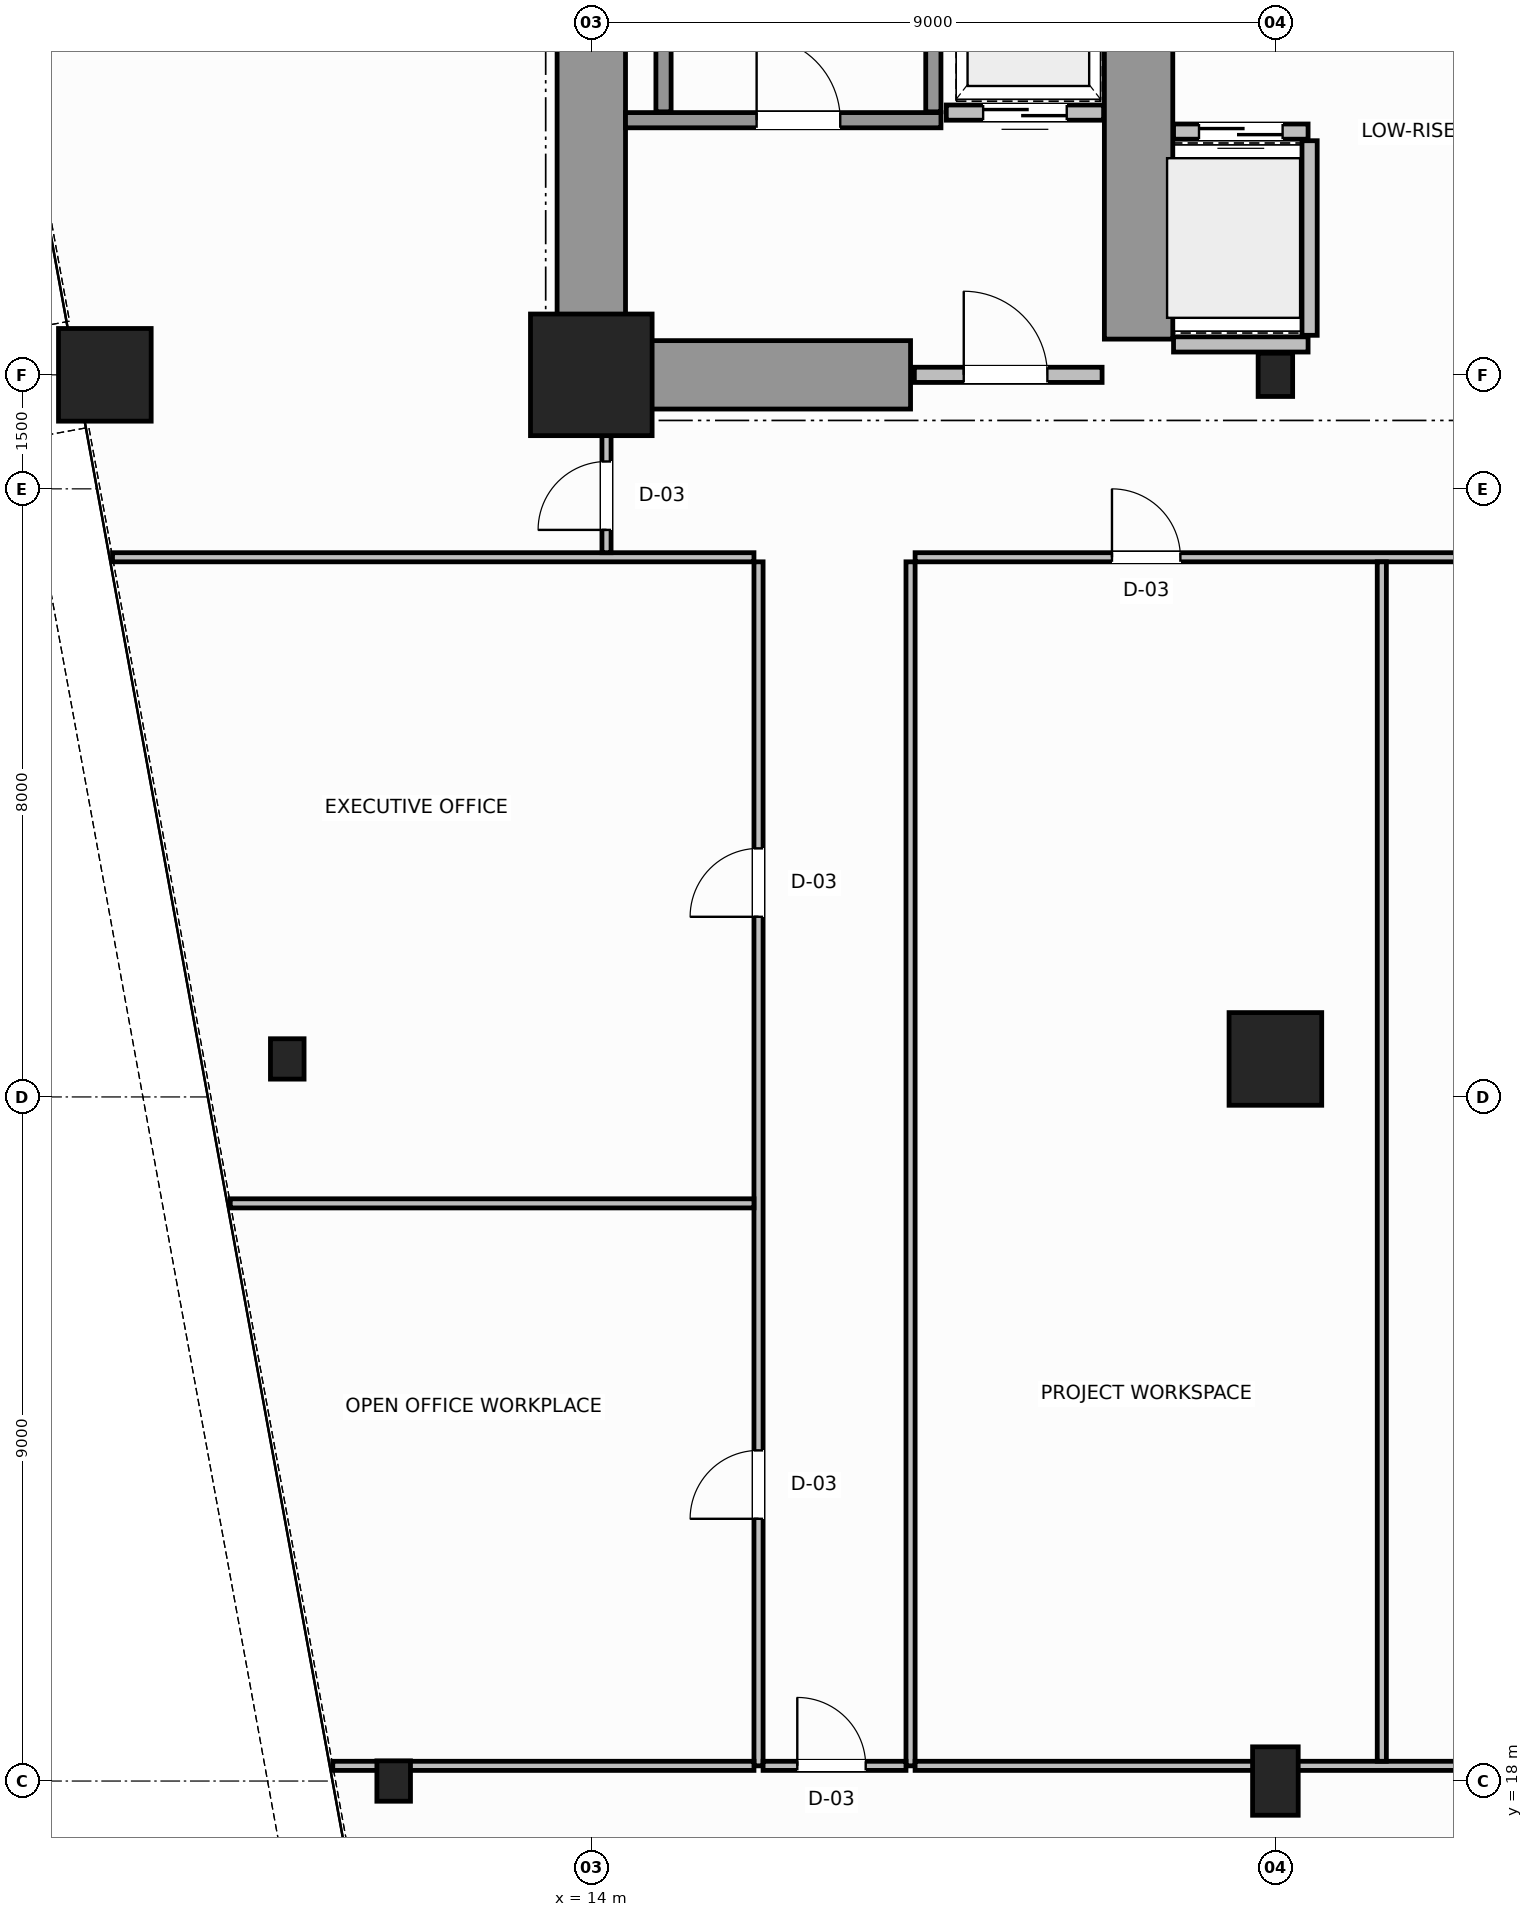
"""IFC4 building model, lengths in metres.
Left out: names, types, materials, properties, quantities, classifications, styles, units other than length and angle.
Written with IfcOpenShell. Run it as: python <this file> out.ifc"""

import sys

from ifc_helpers import new_model, si_unit, direction, frame, frame_2d, origin, origin_2d, place, context, subcontext, project, spatial, rectangle, hollow_rectangle, hollow_circle, i_section, extrude, source, transform, mapped, element, fill, save


model = new_model("IFC4")
c1 = context("Model", 3, precision=1e-05, world=origin(), true_north=direction((0.0, 1.0)))
c2 = subcontext(c1, "Body", "Model", "MODEL_VIEW")
j1 = project(units=[si_unit("LENGTHUNIT", "METRE"), si_unit("PLANEANGLEUNIT", "RADIAN")], contexts=[c1])
p1 = place(None, origin())
s1 = spatial("IfcSite", under=j1, at=p1, CompositionType="ELEMENT")
p2 = place(p1, origin())
s2 = spatial("IfcBuilding", under=s1, at=p2, CompositionType="ELEMENT")
p3 = place(p2, frame((0.0, 0.0, 56.8)))
s3 = spatial("IfcBuildingStorey", under=s2, at=p3, CompositionType="ELEMENT", Elevation=56.8)
m1 = source(origin(), c2, "Body", "SweptSolid", [
    extrude(rectangle(XDim=1.6, YDim=1.6, at=origin_2d()), origin(), (0.0, 0.0, 1.0), 3.8),
])
p4 = place(p3, frame((14.0, 36.5, 0.0), z_axis=(0.0, 0.0, 1.0), x_axis=(1.0, 0.0, 0.0)))
e1 = element("IfcColumn", 1, at=p4, inside=s3, PredefinedType="COLUMN", context=c2, shape_type="MappedRepresentation", body=[
    mapped(m1, transform((0.0, 0.0, 0.0), scale=1.0)),
])
m2 = source(origin(), c2, "Body", "SweptSolid", [
    extrude(i_section(OverallWidth=0.454, OverallDepth=0.569, WebThickness=0.078, FlangeThickness=0.08, FilletRadius=0.015, at=origin_2d()), origin(), (0.0, 0.0, 1.0), 3.8),
])
p5 = place(p3, frame((23.0, 36.5, 0.0), z_axis=(0.0, 0.0, 1.0), x_axis=(1.0, 0.0, 0.0)))
e2 = element("IfcColumn", 2, at=p5, inside=s3, PredefinedType="COLUMN", context=c2, shape_type="MappedRepresentation", body=[
    mapped(m2, transform((0.0, 0.0, 0.0), scale=1.0)),
])
m3 = source(origin(), c2, "Body", "SweptSolid", [
    extrude(hollow_circle(Radius=0.61, WallThickness=0.05, at=origin_2d()), origin(), (0.0, 0.0, 1.0), 3.8),
])
p6 = place(p3, frame((7.6, 36.5, 0.0), z_axis=(0.0, 0.0, 1.0), x_axis=(1.0, 0.0, 0.0)))
e3 = element("IfcColumn", 3, at=p6, inside=s3, PredefinedType="COLUMN", context=c2, shape_type="MappedRepresentation", body=[
    mapped(m3, transform((0.0, 0.0, 0.0), scale=1.0)),
])
m4 = source(origin(), c2, "Body", "SweptSolid", [
    extrude(i_section(OverallWidth=0.442, OverallDepth=0.531, WebThickness=0.065, FlangeThickness=0.076, FilletRadius=0.015, at=origin_2d()), origin(), (0.0, 0.0, 1.0), 3.8),
])
for number, where, z_axis, x_axis in (
    (4, (10.0, 27.5, 0.0), (0.0, 0.0, 1.0), (1.0, 0.0, 0.0)),
    (5, (11.4, 18.0, 0.0), (0.0, 0.0, 1.0), (1.0, 0.0, 0.0)),
):
    element("IfcColumn", number, at=place(p3, frame(where, z_axis=z_axis, x_axis=x_axis)), inside=s3, PredefinedType="COLUMN", context=c2, shape_type="MappedRepresentation", body=[
        mapped(m4, transform((0.0, 0.0, 0.0), scale=1.0)),
    ])
p7 = place(p3, frame((23.0, 27.5, 0.0), z_axis=(0.0, 0.0, 1.0), x_axis=(1.0, 0.0, 0.0)))
e6 = element("IfcColumn", 6, at=p7, inside=s3, PredefinedType="COLUMN", context=c2, shape_type="MappedRepresentation", body=[
    mapped(m3, transform((0.0, 0.0, 0.0), scale=1.0)),
])
m5 = source(origin(), c2, "Body", "SweptSolid", [
    extrude(hollow_rectangle(XDim=0.6, YDim=0.9, WallThickness=0.04, InnerFilletRadius=0.04, OuterFilletRadius=0.08, at=origin_2d()), origin(), (0.0, 0.0, 1.0), 3.8),
])
p8 = place(p3, frame((23.0, 18.0, 0.0), z_axis=(0.0, 0.0, 1.0), x_axis=(1.0, 0.0, 0.0)))
e7 = element("IfcColumn", 7, at=p8, inside=s3, PredefinedType="COLUMN", context=c2, shape_type="MappedRepresentation", body=[
    mapped(m5, transform((0.0, 0.0, 0.0), scale=1.0)),
])
p9 = place(p3, frame((14.0, 36.5, 0.0), z_axis=(0.0, 0.0, 1.0), x_axis=(0.0, 1.0, 0.0)))
e8 = element("IfcWall", 8, at=p9, inside=s3, PredefinedType="SHEAR", context=c2, shape_type="SweptSolid", body=[
    extrude(rectangle(XDim=14.5, YDim=0.9, at=frame_2d((7.25, 0.0))), origin(), (0.0, 0.0, 1.0), 3.8),
])
p10 = place(p3, frame((14.47, 36.5, 0.0), z_axis=(0.0, 0.0, 1.0), x_axis=(1.0, 0.0, 0.0)))
e9 = element("IfcWall", 9, at=p10, inside=s3, PredefinedType="SHEAR", context=c2, shape_type="SweptSolid", body=[
    extrude(rectangle(XDim=3.73, YDim=0.9, at=frame_2d((1.865, 0.0))), origin(), (0.0, 0.0, 1.0), 2.38),
])
p11 = place(p3, frame((21.2, 36.97, 0.0), z_axis=(0.0, 0.0, 1.0), x_axis=(0.0, 1.0, 0.0)))
e10 = element("IfcWall", 10, at=p11, inside=s3, PredefinedType="SHEAR", context=c2, shape_type="SweptSolid", body=[
    extrude(rectangle(XDim=9.23, YDim=0.9, at=frame_2d((4.615, 0.0))), origin(), (0.0, 0.0, 1.0), 3.8),
])
p12 = place(p3, frame((14.45, 39.85, 0.0), z_axis=(0.0, 0.0, 1.0), x_axis=(1.0, 0.0, 0.0)))
e11 = element("IfcWall", 11, at=p12, inside=s3, PredefinedType="SOLIDWALL", context=c2, shape_type="SweptSolid", body=[
    extrude(rectangle(XDim=4.15, YDim=0.2, at=frame_2d((2.075, 0.0))), origin(), (0.0, 0.0, 1.0), 3.8),
])
p13 = place(p12, frame((1.725, 0.0, 0.0)))
e12 = element("IfcOpeningElement", 12, at=p13, cuts=e11, PredefinedType="OPENING", context=c2, shape_type="SweptSolid", body=[
    extrude(rectangle(XDim=1.1, YDim=2.15, at=frame_2d((0.55, 1.075))), frame((0.0, 0.11, 0.0), z_axis=(0.0, -1.0, 0.0), x_axis=(1.0, 0.0, 0.0)), (0.0, 0.0, 1.0), 0.22),
])
for number, where, z_axis, x_axis in (
    (13, (14.95, 39.96, 0.0), (0.0, 0.0, 1.0), (0.0, 1.0, 0.0)),
    (14, (18.5, 39.96, 0.0), (0.0, 0.0, 1.0), (0.0, 1.0, 0.0)),
):
    element("IfcWall", number, at=place(p3, frame(where, z_axis=z_axis, x_axis=x_axis)), inside=s3, PredefinedType="SOLIDWALL", context=c2, shape_type="SweptSolid", body=[
        extrude(rectangle(XDim=9.93, YDim=0.2, at=frame_2d((4.965, 0.0))), origin(), (0.0, 0.0, 1.0), 3.8),
    ])
p14 = place(p3, frame((18.25, 36.5, 0.0), z_axis=(0.0, 0.0, 1.0), x_axis=(1.0, 0.0, 0.0)))
e15 = element("IfcWall", 15, at=p14, inside=s3, PredefinedType="SOLIDWALL", context=c2, shape_type="SweptSolid", body=[
    extrude(rectangle(XDim=2.47, YDim=0.2, at=frame_2d((1.235, 0.0))), origin(), (0.0, 0.0, 1.0), 2.37),
])
p15 = place(p14, frame((0.65, 0.0, 0.0)))
e16 = element("IfcOpeningElement", 16, at=p15, cuts=e15, PredefinedType="OPENING", context=c2, shape_type="SweptSolid", body=[
    extrude(rectangle(XDim=1.1, YDim=2.15, at=frame_2d((0.55, 1.075))), frame((0.0, 0.11, 0.0), z_axis=(0.0, -1.0, 0.0), x_axis=(1.0, 0.0, 0.0)), (0.0, 0.0, 1.0), 0.22),
])
p16 = place(p3, frame((21.66, 39.7, 0.0), z_axis=(0.0, 0.0, 1.0), x_axis=(1.0, 0.0, 0.0)))
e17 = element("IfcWall", 17, at=p16, inside=s3, PredefinedType="SOLIDWALL", context=c2, shape_type="SweptSolid", body=[
    extrude(rectangle(XDim=1.77, YDim=0.2, at=frame_2d((0.885, 0.0))), origin(), (0.0, 0.0, 1.0), 3.58),
])
p17 = place(p16, frame((0.335, 0.0, 0.0)))
e18 = element("IfcOpeningElement", 18, at=p17, cuts=e17, PredefinedType="OPENING", context=c2, shape_type="SweptSolid", body=[
    extrude(rectangle(XDim=1.1, YDim=2.15, at=frame_2d((0.55, 1.075))), frame((0.0, 0.11, 0.0), z_axis=(0.0, -1.0, 0.0), x_axis=(1.0, 0.0, 0.0)), (0.0, 0.0, 1.0), 0.22),
])
p18 = place(p3, frame((21.66, 36.9, 0.0), z_axis=(0.0, 0.0, 1.0), x_axis=(1.0, 0.0, 0.0)))
e19 = element("IfcWall", 19, at=p18, inside=s3, PredefinedType="SOLIDWALL", context=c2, shape_type="SweptSolid", body=[
    extrude(rectangle(XDim=1.77, YDim=0.2, at=frame_2d((0.885, 0.0))), origin(), (0.0, 0.0, 1.0), 2.37),
])
p19 = place(p3, frame((23.45, 37.02, 0.0), z_axis=(0.0, 0.0, 1.0), x_axis=(0.0, 1.0, 0.0)))
e20 = element("IfcWall", 20, at=p19, inside=s3, PredefinedType="SOLIDWALL", context=c2, shape_type="SweptSolid", body=[
    extrude(rectangle(XDim=2.56, YDim=0.2, at=frame_2d((1.28, 0.0))), origin(), (0.0, 0.0, 1.0), 3.58),
])
p20 = place(p3, frame((18.67, 39.95, 0.0), z_axis=(0.0, 0.0, 1.0), x_axis=(1.0, 0.0, 0.0)))
e21 = element("IfcWall", 21, at=p20, inside=s3, PredefinedType="SOLIDWALL", context=c2, shape_type="SweptSolid", body=[
    extrude(rectangle(XDim=2.07, YDim=0.2, at=frame_2d((1.035, 0.0))), origin(), (0.0, 0.0, 1.0), 3.58),
])
p21 = place(p20, frame((0.485, 0.0, 0.0)))
e22 = element("IfcOpeningElement", 22, at=p21, cuts=e21, PredefinedType="OPENING", context=c2, shape_type="SweptSolid", body=[
    extrude(rectangle(XDim=1.1, YDim=2.15, at=frame_2d((0.55, 1.075))), frame((0.0, 0.11, 0.0), z_axis=(0.0, -1.0, 0.0), x_axis=(1.0, 0.0, 0.0)), (0.0, 0.0, 1.0), 0.22),
])
p22 = place(p3, frame((18.26, 34.1, 0.0), z_axis=(0.0, 0.0, 1.0), x_axis=(1.0, 0.0, 0.0)))
e23 = element("IfcWall", 23, at=p22, inside=s3, PredefinedType="PARTITIONING", context=c2, shape_type="SweptSolid", body=[
    extrude(rectangle(XDim=31.48, YDim=0.12, at=frame_2d((15.74, 0.0))), origin(), (0.0, 0.0, 1.0), 3.58),
])
p23 = place(p22, frame((2.59, 0.0, 0.0)))
e24 = element("IfcOpeningElement", 24, at=p23, cuts=e23, PredefinedType="OPENING", context=c2, shape_type="SweptSolid", body=[
    extrude(rectangle(XDim=0.9, YDim=2.15, at=frame_2d((0.45, 1.075))), frame((0.0, 0.07, 0.0), z_axis=(0.0, -1.0, 0.0), x_axis=(1.0, 0.0, 0.0)), (0.0, 0.0, 1.0), 0.14),
])
p24 = place(p22, frame((9.89, 0.0, 0.0)))
e25 = element("IfcOpeningElement", 25, at=p24, cuts=e23, PredefinedType="OPENING", context=c2, shape_type="SweptSolid", body=[
    extrude(rectangle(XDim=0.9, YDim=2.15, at=frame_2d((0.45, 1.075))), frame((0.0, 0.07, 0.0), z_axis=(0.0, -1.0, 0.0), x_axis=(1.0, 0.0, 0.0)), (0.0, 0.0, 1.0), 0.14),
])
p25 = place(p22, frame((18.79, 0.0, 0.0)))
e26 = element("IfcOpeningElement", 26, at=p25, cuts=e23, PredefinedType="OPENING", context=c2, shape_type="SweptSolid", body=[
    extrude(rectangle(XDim=0.9, YDim=2.15, at=frame_2d((0.45, 1.075))), frame((0.0, 0.07, 0.0), z_axis=(0.0, -1.0, 0.0), x_axis=(1.0, 0.0, 0.0)), (0.0, 0.0, 1.0), 0.14),
])
p26 = place(p22, frame((27.29, 0.0, 0.0)))
e27 = element("IfcOpeningElement", 27, at=p26, cuts=e23, PredefinedType="OPENING", context=c2, shape_type="SweptSolid", body=[
    extrude(rectangle(XDim=0.9, YDim=2.15, at=frame_2d((0.45, 1.075))), frame((0.0, 0.07, 0.0), z_axis=(0.0, -1.0, 0.0), x_axis=(1.0, 0.0, 0.0)), (0.0, 0.0, 1.0), 0.14),
])
p27 = place(p3, frame((7.701, 34.1, 0.0), z_axis=(0.0, 0.0, 1.0), x_axis=(1.0, 0.0, 0.0)))
e28 = element("IfcWall", 28, at=p27, inside=s3, PredefinedType="PARTITIONING", context=c2, shape_type="SweptSolid", body=[
    extrude(rectangle(XDim=8.439, YDim=0.12, at=frame_2d((4.22, 0.0))), origin(), (0.0, 0.0, 1.0), 3.58),
])
p28 = place(p3, frame((14.2, 34.16, 0.0), z_axis=(0.0, 0.0, 1.0), x_axis=(0.0, 1.0, 0.0)))
e29 = element("IfcWall", 29, at=p28, inside=s3, PredefinedType="PARTITIONING", context=c2, shape_type="SweptSolid", body=[
    extrude(rectangle(XDim=2.28, YDim=0.12, at=frame_2d((1.14, 0.0))), origin(), (0.0, 0.0, 1.0), 3.58),
])
p29 = place(p28, frame((0.3, 0.0, 0.0)))
e30 = element("IfcOpeningElement", 30, at=p29, cuts=e29, PredefinedType="OPENING", context=c2, shape_type="SweptSolid", body=[
    extrude(rectangle(XDim=0.9, YDim=2.15, at=frame_2d((0.45, 1.075))), frame((0.0, 0.07, 0.0), z_axis=(0.0, -1.0, 0.0), x_axis=(1.0, 0.0, 0.0)), (0.0, 0.0, 1.0), 0.14),
])
p30 = place(p3, frame((16.2, 18.2, 0.0), z_axis=(0.0, 0.0, 1.0), x_axis=(0.0, 1.0, 0.0)))
e31 = element("IfcWall", 31, at=p30, inside=s3, PredefinedType="PARTITIONING", context=c2, shape_type="SweptSolid", body=[
    extrude(rectangle(XDim=15.84, YDim=0.12, at=frame_2d((7.92, 0.0))), origin(), (0.0, 0.0, 1.0), 3.58),
])
p31 = place(p30, frame((3.25, 0.0, 0.0)))
e32 = element("IfcOpeningElement", 32, at=p31, cuts=e31, PredefinedType="OPENING", context=c2, shape_type="SweptSolid", body=[
    extrude(rectangle(XDim=0.9, YDim=2.15, at=frame_2d((0.45, 1.075))), frame((0.0, 0.07, 0.0), z_axis=(0.0, -1.0, 0.0), x_axis=(1.0, 0.0, 0.0)), (0.0, 0.0, 1.0), 0.14),
])
p32 = place(p30, frame((11.17, 0.0, 0.0)))
e33 = element("IfcOpeningElement", 33, at=p32, cuts=e31, PredefinedType="OPENING", context=c2, shape_type="SweptSolid", body=[
    extrude(rectangle(XDim=0.9, YDim=2.15, at=frame_2d((0.45, 1.075))), frame((0.0, 0.07, 0.0), z_axis=(0.0, -1.0, 0.0), x_axis=(1.0, 0.0, 0.0)), (0.0, 0.0, 1.0), 0.14),
])
p33 = place(p3, frame((18.2, 18.2, 0.0), z_axis=(0.0, 0.0, 1.0), x_axis=(0.0, 1.0, 0.0)))
e34 = element("IfcWall", 34, at=p33, inside=s3, PredefinedType="PARTITIONING", context=c2, shape_type="SweptSolid", body=[
    extrude(rectangle(XDim=15.84, YDim=0.12, at=frame_2d((7.92, 0.0))), origin(), (0.0, 0.0, 1.0), 3.58),
])
p34 = place(p3, frame((16.26, 18.2, 0.0), z_axis=(0.0, 0.0, 1.0), x_axis=(1.0, 0.0, 0.0)))
e35 = element("IfcWall", 35, at=p34, inside=s3, PredefinedType="PARTITIONING", context=c2, shape_type="SweptSolid", body=[
    extrude(rectangle(XDim=1.88, YDim=0.12, at=frame_2d((0.94, 0.0))), origin(), (0.0, 0.0, 1.0), 2.77),
])
p35 = place(p34, frame((0.45, 0.0, 0.0)))
e36 = element("IfcOpeningElement", 36, at=p35, cuts=e35, PredefinedType="OPENING", context=c2, shape_type="SweptSolid", body=[
    extrude(rectangle(XDim=0.9, YDim=2.15, at=frame_2d((0.45, 1.075))), frame((0.0, 0.07, 0.0), z_axis=(0.0, -1.0, 0.0), x_axis=(1.0, 0.0, 0.0)), (0.0, 0.0, 1.0), 0.14),
])
p36 = place(p3, frame((10.598, 18.2, 0.0), z_axis=(0.0, 0.0, 1.0), x_axis=(1.0, 0.0, 0.0)))
e37 = element("IfcWall", 37, at=p36, inside=s3, PredefinedType="PARTITIONING", context=c2, shape_type="SweptSolid", body=[
    extrude(rectangle(XDim=5.542, YDim=0.12, at=frame_2d((2.771, 0.0))), origin(), (0.0, 0.0, 1.0), 2.77),
])
p37 = place(p3, frame((9.25, 25.6, 0.0), z_axis=(0.0, 0.0, 1.0), x_axis=(1.0, 0.0, 0.0)))
e38 = element("IfcWall", 38, at=p37, inside=s3, PredefinedType="PARTITIONING", context=c2, shape_type="SweptSolid", body=[
    extrude(rectangle(XDim=6.89, YDim=0.12, at=frame_2d((3.445, 0.0))), origin(), (0.0, 0.0, 1.0), 3.58),
])
p38 = place(p3, frame((18.26, 18.2, 0.0), z_axis=(0.0, 0.0, 1.0), x_axis=(1.0, 0.0, 0.0)))
e39 = element("IfcWall", 39, at=p38, inside=s3, PredefinedType="PARTITIONING", context=c2, shape_type="SweptSolid", body=[
    extrude(rectangle(XDim=31.48, YDim=0.12, at=frame_2d((15.74, 0.0))), origin(), (0.0, 0.0, 1.0), 2.77),
])
p39 = place(p3, frame((24.4, 18.26, 0.0), z_axis=(0.0, 0.0, 1.0), x_axis=(0.0, 1.0, 0.0)))
e40 = element("IfcWall", 40, at=p39, inside=s3, PredefinedType="PARTITIONING", context=c2, shape_type="SweptSolid", body=[
    extrude(rectangle(XDim=15.78, YDim=0.12, at=frame_2d((7.89, 0.0))), origin(), (0.0, 0.0, 1.0), 3.58),
])
m6 = source(origin(), c2, "Body", "SweptSolid", [
    extrude(rectangle(XDim=1.1, YDim=2.15, at=frame_2d((0.55, 1.075))), frame((0.0, 0.025, 0.0), z_axis=(0.0, -1.0, 0.0), x_axis=(1.0, 0.0, 0.0)), (0.0, 0.0, 1.0), 0.05),
])
p40 = place(p13, origin())
e41 = element("IfcDoor", 41, at=p40, inside=s3, OperationType="SINGLE_SWING_LEFT", PredefinedType="DOOR", context=c2, shape_type="MappedRepresentation", body=[
    mapped(m6, transform((0.0, 0.0, 0.0), scale=1.0)),
])
fill(e12, e41)
p41 = place(p15, origin())
e42 = element("IfcDoor", 42, at=p41, inside=s3, OperationType="SINGLE_SWING_RIGHT", PredefinedType="DOOR", context=c2, shape_type="MappedRepresentation", body=[
    mapped(m6, transform((0.0, 0.0, 0.0), scale=1.0)),
])
fill(e16, e42)
p42 = place(p17, origin())
e43 = element("IfcDoor", 43, at=p42, inside=s3, OperationType="DOUBLE_DOOR_SLIDING", PredefinedType="DOOR", context=c2, shape_type="MappedRepresentation", body=[
    mapped(m6, transform((0.0, 0.0, 0.0), scale=1.0)),
])
fill(e18, e43)
p43 = place(p21, origin())
e44 = element("IfcDoor", 44, at=p43, inside=s3, OperationType="DOUBLE_DOOR_SLIDING", PredefinedType="DOOR", context=c2, shape_type="MappedRepresentation", body=[
    mapped(m6, transform((0.0, 0.0, 0.0), scale=1.0)),
])
fill(e22, e44)
m7 = source(origin(), c2, "Body", "SweptSolid", [
    extrude(rectangle(XDim=0.9, YDim=2.15, at=frame_2d((0.45, 1.075))), frame((0.0, 0.025, 0.0), z_axis=(0.0, -1.0, 0.0), x_axis=(1.0, 0.0, 0.0)), (0.0, 0.0, 1.0), 0.05),
])
p44 = place(p29, origin())
e45 = element("IfcDoor", 45, at=p44, inside=s3, OperationType="SINGLE_SWING_LEFT", PredefinedType="DOOR", context=c2, shape_type="MappedRepresentation", body=[
    mapped(m7, transform((0.0, 0.0, 0.0), scale=1.0)),
])
fill(e30, e45)
p45 = place(p31, origin())
e46 = element("IfcDoor", 46, at=p45, inside=s3, OperationType="SINGLE_SWING_LEFT", PredefinedType="DOOR", context=c2, shape_type="MappedRepresentation", body=[
    mapped(m7, transform((0.0, 0.0, 0.0), scale=1.0)),
])
fill(e32, e46)
p46 = place(p32, origin())
e47 = element("IfcDoor", 47, at=p46, inside=s3, OperationType="SINGLE_SWING_RIGHT", PredefinedType="DOOR", context=c2, shape_type="MappedRepresentation", body=[
    mapped(m7, transform((0.0, 0.0, 0.0), scale=1.0)),
])
fill(e33, e47)
p47 = place(p23, origin())
e48 = element("IfcDoor", 48, at=p47, inside=s3, OperationType="SINGLE_SWING_LEFT", PredefinedType="DOOR", context=c2, shape_type="MappedRepresentation", body=[
    mapped(m7, transform((0.0, 0.0, 0.0), scale=1.0)),
])
fill(e24, e48)
p48 = place(p35, origin())
e49 = element("IfcDoor", 49, at=p48, inside=s3, OperationType="SINGLE_SWING_LEFT", PredefinedType="DOOR", context=c2, shape_type="MappedRepresentation", body=[
    mapped(m7, transform((0.0, 0.0, 0.0), scale=1.0)),
])
fill(e36, e49)
save(model, sys.argv[1])
